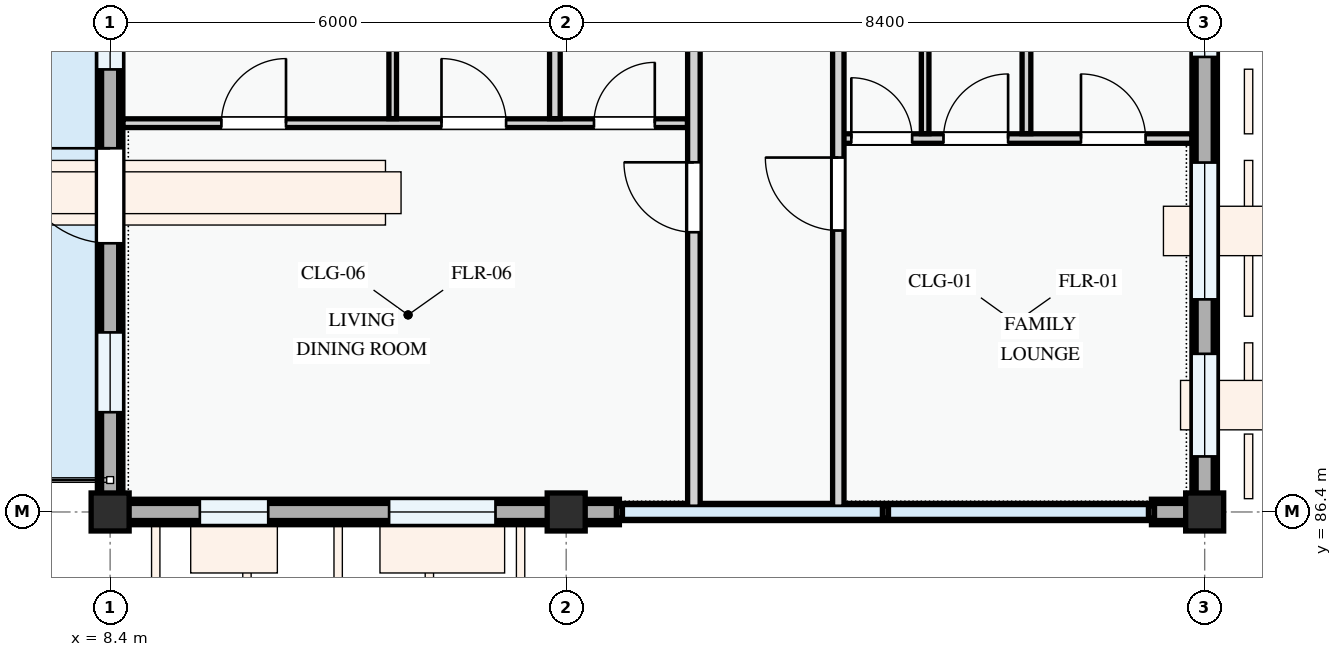
"""IFC4 building model, lengths in metres.
Left out: names, types, materials, properties, quantities, classifications, styles, units other than length and angle.
Written with IfcOpenShell. Run it as: python <this file> out.ifc"""

import sys

from ifc_helpers import new_model, si_unit, direction, frame, frame_2d, origin, origin_2d, place, context, subcontext, project, spatial, polyline, rectangle, outline, extrude, element, fill, save


model = new_model("IFC4")
c1 = context("Model", 3, precision=1e-05, world=origin(), true_north=direction((0.0, 1.0)))
c2 = subcontext(c1, "Body", "Model", "MODEL_VIEW")
j1 = project(units=[si_unit("LENGTHUNIT", "METRE"), si_unit("PLANEANGLEUNIT", "RADIAN")], contexts=[c1])
p1 = place(None, origin())
s1 = spatial("IfcSite", under=j1, at=p1, CompositionType="ELEMENT")
p2 = place(p1, origin())
s2 = spatial("IfcBuilding", under=s1, at=p2, CompositionType="ELEMENT")
p3 = place(p2, frame((0.0, 0.0, 51.0)))
s3 = spatial("IfcBuildingStorey", under=s2, at=p3, CompositionType="ELEMENT", Elevation=51.0)
for number, where, z_axis, x_axis in (
    (1, (8.4, 86.4, 0.0), (0.0, 0.0, 1.0), (1.0, 0.0, 0.0)),
    (2, (14.4, 86.4, 0.0), (0.0, 0.0, 1.0), (1.0, 0.0, 0.0)),
    (3, (22.8, 86.4, 0.0), (0.0, 0.0, 1.0), (1.0, 0.0, 0.0)),
):
    element("IfcColumn", number, at=place(p3, frame(where, z_axis=z_axis, x_axis=x_axis)), inside=s3, PredefinedType="COLUMN", context=c2, shape_type="SweptSolid", body=[
        extrude(rectangle(XDim=0.5, YDim=0.5, at=origin_2d()), origin(), (0.0, 0.0, 1.0), 3.3),
    ])
p4 = place(p3, frame((8.4, 94.8, 0.0), z_axis=(0.0, 0.0, 1.0), x_axis=(0.0, -1.0, 0.0)))
e4 = element("IfcWall", 4, at=p4, inside=s3, PredefinedType="STANDARD", context=c2, shape_type="SweptSolid", body=[
    extrude(rectangle(XDim=8.4, YDim=0.335, at=frame_2d((4.2, 0.0))), origin(), (0.0, 0.0, 1.0), 2.445),
])
p5 = place(p4, frame((3.615, 0.0, 0.0)))
e5 = element("IfcOpeningElement", 5, at=p5, cuts=e4, PredefinedType="OPENING", context=c2, shape_type="SweptSolid", body=[
    extrude(rectangle(XDim=1.25, YDim=2.2, at=frame_2d((0.625, 1.1))), frame((0.0, 0.177, 0.0), z_axis=(0.0, -1.0, 0.0), x_axis=(1.0, 0.0, 0.0)), (0.0, 0.0, 1.0), 0.355),
])
p6 = place(p4, frame((0.897, 0.0, 0.78)))
e6 = element("IfcOpeningElement", 6, at=p6, cuts=e4, PredefinedType="OPENING", context=c2, shape_type="SweptSolid", body=[
    extrude(rectangle(XDim=1.68, YDim=1.46, at=frame_2d((0.84, 0.73))), frame((0.0, 0.177, 0.0), z_axis=(0.0, -1.0, 0.0), x_axis=(1.0, 0.0, 0.0)), (0.0, 0.0, 1.0), 0.355),
])
p7 = place(p4, frame((6.038, 0.0, 0.78)))
e7 = element("IfcOpeningElement", 7, at=p7, cuts=e4, PredefinedType="OPENING", context=c2, shape_type="SweptSolid", body=[
    extrude(rectangle(XDim=1.05, YDim=1.2, at=frame_2d((0.525, 0.6))), frame((0.0, 0.177, 0.0), z_axis=(0.0, -1.0, 0.0), x_axis=(1.0, 0.0, 0.0)), (0.0, 0.0, 1.0), 0.355),
])
p8 = place(p3, frame((8.4, 86.4, 0.0), z_axis=(0.0, 0.0, 1.0), x_axis=(1.0, 0.0, 0.0)))
e8 = element("IfcWall", 8, at=p8, inside=s3, PredefinedType="STANDARD", context=c2, shape_type="SweptSolid", body=[
    extrude(rectangle(XDim=6.0, YDim=0.335, at=frame_2d((3.0, 0.0))), origin(), (0.0, 0.0, 1.0), 2.545),
])
p9 = place(p8, frame((1.18, 0.0, 0.78)))
e9 = element("IfcOpeningElement", 9, at=p9, cuts=e8, PredefinedType="OPENING", context=c2, shape_type="SweptSolid", body=[
    extrude(rectangle(XDim=0.9, YDim=1.2, at=frame_2d((0.45, 0.6))), frame((0.0, 0.177, 0.0), z_axis=(0.0, -1.0, 0.0), x_axis=(1.0, 0.0, 0.0)), (0.0, 0.0, 1.0), 0.355),
])
p10 = place(p8, frame((3.67, 0.0, 0.78)))
e10 = element("IfcOpeningElement", 10, at=p10, cuts=e8, PredefinedType="OPENING", context=c2, shape_type="SweptSolid", body=[
    extrude(rectangle(XDim=1.4, YDim=1.45, at=frame_2d((0.7, 0.725))), frame((0.0, 0.177, 0.0), z_axis=(0.0, -1.0, 0.0), x_axis=(1.0, 0.0, 0.0)), (0.0, 0.0, 1.0), 0.355),
])
p11 = place(p3, frame((14.4, 86.4, 0.0), z_axis=(0.0, 0.0, 1.0), x_axis=(1.0, 0.0, 0.0)))
e11 = element("IfcWall", 11, at=p11, inside=s3, PredefinedType="STANDARD", context=c2, shape_type="SweptSolid", body=[
    extrude(rectangle(XDim=0.7, YDim=0.335, at=frame_2d((0.35, 0.0))), origin(), (0.0, 0.0, 1.0), 2.395),
])
p12 = place(p3, frame((22.1, 86.4, 0.0), z_axis=(0.0, 0.0, 1.0), x_axis=(1.0, 0.0, 0.0)))
e12 = element("IfcWall", 12, at=p12, inside=s3, PredefinedType="STANDARD", context=c2, shape_type="SweptSolid", body=[
    extrude(rectangle(XDim=0.531, YDim=0.335, at=frame_2d((0.265, 0.0))), origin(), (0.0, 0.0, 1.0), 2.395),
])
p13 = place(p3, frame((22.8, 86.4, 0.0), z_axis=(0.0, 0.0, 1.0), x_axis=(0.0, 1.0, 0.0)))
e13 = element("IfcWall", 13, at=p13, inside=s3, PredefinedType="STANDARD", context=c2, shape_type="SweptSolid", body=[
    extrude(rectangle(XDim=8.4, YDim=0.335, at=frame_2d((4.2, 0.0))), origin(), (0.0, 0.0, 1.0), 2.445),
])
p14 = place(p13, frame((0.731, 0.0, 0.78)))
e14 = element("IfcOpeningElement", 14, at=p14, cuts=e13, PredefinedType="OPENING", context=c2, shape_type="SweptSolid", body=[
    extrude(rectangle(XDim=1.35, YDim=1.55, at=frame_2d((0.675, 0.775))), frame((0.0, 0.177, 0.0), z_axis=(0.0, -1.0, 0.0), x_axis=(1.0, 0.0, 0.0)), (0.0, 0.0, 1.0), 0.355),
])
p15 = place(p13, frame((2.797, 0.0, 0.78)))
e15 = element("IfcOpeningElement", 15, at=p15, cuts=e13, PredefinedType="OPENING", context=c2, shape_type="SweptSolid", body=[
    extrude(rectangle(XDim=1.8, YDim=1.5, at=frame_2d((0.9, 0.75))), frame((0.0, 0.177, 0.0), z_axis=(0.0, -1.0, 0.0), x_axis=(1.0, 0.0, 0.0)), (0.0, 0.0, 1.0), 0.355),
])
p16 = place(p13, frame((5.986, 0.0, 0.78)))
e16 = element("IfcOpeningElement", 16, at=p16, cuts=e13, PredefinedType="OPENING", context=c2, shape_type="SweptSolid", body=[
    extrude(rectangle(XDim=1.15, YDim=1.25, at=frame_2d((0.575, 0.625))), frame((0.0, 0.177, 0.0), z_axis=(0.0, -1.0, 0.0), x_axis=(1.0, 0.0, 0.0)), (0.0, 0.0, 1.0), 0.355),
])
p17 = place(p3, frame((8.4, 94.8, 3.3), z_axis=(0.0, 0.0, 1.0), x_axis=(0.0, -1.0, 0.0)))
e17 = element("IfcWall", 17, at=p17, inside=s3, PredefinedType="PARAPET", context=c2, shape_type="SweptSolid", body=[
    extrude(outline(polyline([(0.0, 0.0), (8.4, 0.0), (8.4, 1.12), (7.7, 1.322), (7.0, 1.484), (6.3, 1.618), (5.6, 1.717), (4.9, 1.779), (4.2, 1.8), (3.5, 1.779), (2.8, 1.717), (2.1, 1.618), (1.4, 1.484), (0.7, 1.322), (0.0, 1.12), (0.0, 0.0)])), frame((0.0, 0.113, 0.0), z_axis=(0.0, -1.0, 0.0), x_axis=(1.0, 0.0, 0.0)), (0.0, 0.0, 1.0), 0.225),
])
p18 = place(p3, frame((8.4, 86.4, 3.3), z_axis=(0.0, 0.0, 1.0), x_axis=(1.0, 0.0, 0.0)))
e18 = element("IfcWall", 18, at=p18, inside=s3, PredefinedType="PARAPET", context=c2, shape_type="SweptSolid", body=[
    extrude(rectangle(XDim=14.4, YDim=0.225, at=frame_2d((7.2, 0.0))), origin(), (0.0, 0.0, 1.0), 1.15),
])
p19 = place(p3, frame((22.8, 86.4, 3.3), z_axis=(0.0, 0.0, 1.0), x_axis=(0.0, 1.0, 0.0)))
e19 = element("IfcWall", 19, at=p19, inside=s3, PredefinedType="PARAPET", context=c2, shape_type="SweptSolid", body=[
    extrude(rectangle(XDim=22.8, YDim=0.225, at=frame_2d((11.4, 0.0))), origin(), (0.0, 0.0, 1.0), 1.15),
])
p20 = place(p3, frame((8.57, 91.515, 0.0), z_axis=(0.0, 0.0, 1.0), x_axis=(1.0, 0.0, 0.0)))
e20 = element("IfcWall", 20, at=p20, inside=s3, PredefinedType="PARTITIONING", context=c2, shape_type="SweptSolid", body=[
    extrude(rectangle(XDim=7.426, YDim=0.115, at=frame_2d((3.713, 0.0))), origin(), (0.0, 0.0, 1.0), 3.0),
])
p21 = place(p20, frame((1.294, 0.0, 0.0)))
e21 = element("IfcOpeningElement", 21, at=p21, cuts=e20, PredefinedType="OPENING", context=c2, shape_type="SweptSolid", body=[
    extrude(rectangle(XDim=0.85, YDim=2.1, at=frame_2d((0.425, 1.05))), frame((0.0, 0.067, 0.0), z_axis=(0.0, -1.0, 0.0), x_axis=(1.0, 0.0, 0.0)), (0.0, 0.0, 1.0), 0.135),
])
p22 = place(p20, frame((4.19, 0.0, 0.0)))
e22 = element("IfcOpeningElement", 22, at=p22, cuts=e20, PredefinedType="OPENING", context=c2, shape_type="SweptSolid", body=[
    extrude(rectangle(XDim=0.85, YDim=2.1, at=frame_2d((0.425, 1.05))), frame((0.0, 0.067, 0.0), z_axis=(0.0, -1.0, 0.0), x_axis=(1.0, 0.0, 0.0)), (0.0, 0.0, 1.0), 0.135),
])
p23 = place(p20, frame((6.196, 0.0, 0.0)))
e23 = element("IfcOpeningElement", 23, at=p23, cuts=e20, PredefinedType="OPENING", context=c2, shape_type="SweptSolid", body=[
    extrude(rectangle(XDim=0.8, YDim=2.1, at=frame_2d((0.4, 1.05))), frame((0.0, 0.067, 0.0), z_axis=(0.0, -1.0, 0.0), x_axis=(1.0, 0.0, 0.0)), (0.0, 0.0, 1.0), 0.135),
])
p24 = place(p3, frame((12.118, 91.574, 0.0), z_axis=(0.0, 0.0, 1.0), x_axis=(0.0, 1.0, 0.0)))
e24 = element("IfcWall", 24, at=p24, inside=s3, PredefinedType="PARTITIONING", context=c2, shape_type="SweptSolid", body=[
    extrude(rectangle(XDim=4.884, YDim=0.1, at=frame_2d((2.442, 0.0))), origin(), (0.0, 0.0, 1.0), 3.0),
])
p25 = place(p3, frame((14.251, 91.574, 0.0), z_axis=(0.0, 0.0, 1.0), x_axis=(0.0, 1.0, 0.0)))
e25 = element("IfcWall", 25, at=p25, inside=s3, PredefinedType="PARTITIONING", context=c2, shape_type="SweptSolid", body=[
    extrude(rectangle(XDim=4.884, YDim=0.14, at=frame_2d((2.442, 0.0))), origin(), (0.0, 0.0, 1.0), 2.445),
])
p26 = place(p3, frame((17.98, 91.313, 0.0), z_axis=(0.0, 0.0, 1.0), x_axis=(1.0, 0.0, 0.0)))
e26 = element("IfcWall", 26, at=p26, inside=s3, PredefinedType="PARTITIONING", context=c2, shape_type="SweptSolid", body=[
    extrude(rectangle(XDim=4.651, YDim=0.125, at=frame_2d((2.325, 0.0))), origin(), (0.0, 0.0, 1.0), 3.0),
])
p27 = place(p26, frame((0.171, 0.0, 0.0)))
e27 = element("IfcOpeningElement", 27, at=p27, cuts=e26, PredefinedType="OPENING", context=c2, shape_type="SweptSolid", body=[
    extrude(rectangle(XDim=0.8, YDim=2.1, at=frame_2d((0.4, 1.05))), frame((0.0, 0.073, 0.0), z_axis=(0.0, -1.0, 0.0), x_axis=(1.0, 0.0, 0.0)), (0.0, 0.0, 1.0), 0.145),
])
p28 = place(p26, frame((1.384, 0.0, 0.0)))
e28 = element("IfcOpeningElement", 28, at=p28, cuts=e26, PredefinedType="OPENING", context=c2, shape_type="SweptSolid", body=[
    extrude(rectangle(XDim=0.85, YDim=2.1, at=frame_2d((0.425, 1.05))), frame((0.0, 0.073, 0.0), z_axis=(0.0, -1.0, 0.0), x_axis=(1.0, 0.0, 0.0)), (0.0, 0.0, 1.0), 0.145),
])
p29 = place(p26, frame((3.193, 0.0, 0.0)))
e29 = element("IfcOpeningElement", 29, at=p29, cuts=e26, PredefinedType="OPENING", context=c2, shape_type="SweptSolid", body=[
    extrude(rectangle(XDim=0.85, YDim=2.1, at=frame_2d((0.425, 1.05))), frame((0.0, 0.073, 0.0), z_axis=(0.0, -1.0, 0.0), x_axis=(1.0, 0.0, 0.0)), (0.0, 0.0, 1.0), 0.145),
])
p30 = place(p3, frame((20.455, 91.377, 0.0), z_axis=(0.0, 0.0, 1.0), x_axis=(0.0, 1.0, 0.0)))
e30 = element("IfcWall", 30, at=p30, inside=s3, PredefinedType="PARTITIONING", context=c2, shape_type="SweptSolid", body=[
    extrude(rectangle(XDim=5.098, YDim=0.115, at=frame_2d((2.549, 0.0))), origin(), (0.0, 0.0, 1.0), 3.0),
])
p31 = place(p3, frame((19.122, 91.377, 0.0), z_axis=(0.0, 0.0, 1.0), x_axis=(0.0, 1.0, 0.0)))
e31 = element("IfcWall", 31, at=p31, inside=s3, PredefinedType="PARTITIONING", context=c2, shape_type="SweptSolid", body=[
    extrude(rectangle(XDim=5.098, YDim=0.1, at=frame_2d((2.549, 0.0))), origin(), (0.0, 0.0, 1.0), 3.0),
])
p32 = place(p3, frame((16.08, 86.46, 0.0), z_axis=(0.0, 0.0, 1.0), x_axis=(0.0, 1.0, 0.0)))
e32 = element("IfcWall", 32, at=p32, inside=s3, PredefinedType="PARTITIONING", context=c2, shape_type="SweptSolid", body=[
    extrude(rectangle(XDim=22.88, YDim=0.165, at=frame_2d((11.44, 0.0))), origin(), (0.0, 0.0, 1.0), 3.0),
])
p33 = place(p32, frame((3.62, 0.0, 0.0)))
e33 = element("IfcOpeningElement", 33, at=p33, cuts=e32, PredefinedType="OPENING", context=c2, shape_type="SweptSolid", body=[
    extrude(rectangle(XDim=0.92, YDim=2.1, at=frame_2d((0.46, 1.05))), frame((0.0, 0.093, 0.0), z_axis=(0.0, -1.0, 0.0), x_axis=(1.0, 0.0, 0.0)), (0.0, 0.0, 1.0), 0.185),
])
p34 = place(p32, frame((10.822, 0.0, 0.0)))
e34 = element("IfcOpeningElement", 34, at=p34, cuts=e32, PredefinedType="OPENING", context=c2, shape_type="SweptSolid", body=[
    extrude(rectangle(XDim=0.92, YDim=2.1, at=frame_2d((0.46, 1.05))), frame((0.0, 0.093, 0.0), z_axis=(0.0, -1.0, 0.0), x_axis=(1.0, 0.0, 0.0)), (0.0, 0.0, 1.0), 0.185),
])
p35 = place(p3, frame((17.98, 86.46, 0.0), z_axis=(0.0, 0.0, 1.0), x_axis=(0.0, 1.0, 0.0)))
e35 = element("IfcWall", 35, at=p35, inside=s3, PredefinedType="PARTITIONING", context=c2, shape_type="SweptSolid", body=[
    extrude(rectangle(XDim=22.88, YDim=0.15, at=frame_2d((11.44, 0.0))), origin(), (0.0, 0.0, 1.0), 3.0),
])
p36 = place(p35, frame((3.643, 0.0, 0.0)))
e36 = element("IfcOpeningElement", 36, at=p36, cuts=e35, PredefinedType="OPENING", context=c2, shape_type="SweptSolid", body=[
    extrude(rectangle(XDim=0.96, YDim=2.12, at=frame_2d((0.48, 1.06))), frame((0.0, 0.085, 0.0), z_axis=(0.0, -1.0, 0.0), x_axis=(1.0, 0.0, 0.0)), (0.0, 0.0, 1.0), 0.17),
])
p37 = place(p35, frame((10.798, 0.0, 0.0)))
e37 = element("IfcOpeningElement", 37, at=p37, cuts=e35, PredefinedType="OPENING", context=c2, shape_type="SweptSolid", body=[
    extrude(rectangle(XDim=0.92, YDim=2.1, at=frame_2d((0.46, 1.05))), frame((0.0, 0.085, 0.0), z_axis=(0.0, -1.0, 0.0), x_axis=(1.0, 0.0, 0.0)), (0.0, 0.0, 1.0), 0.17),
])
p38 = place(p5, frame((1.25, 0.0, 0.0), z_axis=(0.0, 0.0, 1.0), x_axis=(-1.0, 0.0, 0.0)))
e38 = element("IfcDoor", 38, at=p38, inside=s3, OperationType="SINGLE_SWING_RIGHT", PredefinedType="DOOR", context=c2, shape_type="SweptSolid", body=[
    extrude(rectangle(XDim=1.25, YDim=2.2, at=frame_2d((0.625, 1.1))), frame((0.0, 0.025, 0.0), z_axis=(0.0, -1.0, 0.0), x_axis=(1.0, 0.0, 0.0)), (0.0, 0.0, 1.0), 0.05),
])
fill(e5, e38)
p39 = place(p6, origin())
e39 = element("IfcWindow", 39, at=p39, inside=s3, PartitioningType="DOUBLE_PANEL_VERTICAL", PredefinedType="WINDOW", context=c2, shape_type="SweptSolid", body=[
    extrude(rectangle(XDim=1.68, YDim=1.46, at=frame_2d((0.84, 0.73))), frame((0.0, 0.03, 0.0), z_axis=(0.0, -1.0, 0.0), x_axis=(1.0, 0.0, 0.0)), (0.0, 0.0, 1.0), 0.06),
])
fill(e6, e39)
p40 = place(p7, origin())
e40 = element("IfcWindow", 40, at=p40, inside=s3, PartitioningType="SINGLE_PANEL", PredefinedType="WINDOW", context=c2, shape_type="SweptSolid", body=[
    extrude(rectangle(XDim=1.05, YDim=1.2, at=frame_2d((0.525, 0.6))), frame((0.0, 0.03, 0.0), z_axis=(0.0, -1.0, 0.0), x_axis=(1.0, 0.0, 0.0)), (0.0, 0.0, 1.0), 0.06),
])
fill(e7, e40)
p41 = place(p9, origin())
e41 = element("IfcWindow", 41, at=p41, inside=s3, PartitioningType="SINGLE_PANEL", PredefinedType="WINDOW", context=c2, shape_type="SweptSolid", body=[
    extrude(rectangle(XDim=0.9, YDim=1.2, at=frame_2d((0.45, 0.6))), frame((0.0, 0.03, 0.0), z_axis=(0.0, -1.0, 0.0), x_axis=(1.0, 0.0, 0.0)), (0.0, 0.0, 1.0), 0.06),
])
fill(e9, e41)
p42 = place(p10, origin())
e42 = element("IfcWindow", 42, at=p42, inside=s3, PartitioningType="SINGLE_PANEL", PredefinedType="WINDOW", context=c2, shape_type="SweptSolid", body=[
    extrude(rectangle(XDim=1.4, YDim=1.45, at=frame_2d((0.7, 0.725))), frame((0.0, 0.03, 0.0), z_axis=(0.0, -1.0, 0.0), x_axis=(1.0, 0.0, 0.0)), (0.0, 0.0, 1.0), 0.06),
])
fill(e10, e42)
p43 = place(p14, origin())
e43 = element("IfcWindow", 43, at=p43, inside=s3, PartitioningType="SINGLE_PANEL", PredefinedType="WINDOW", context=c2, shape_type="SweptSolid", body=[
    extrude(rectangle(XDim=1.35, YDim=1.55, at=frame_2d((0.675, 0.775))), frame((0.0, 0.03, 0.0), z_axis=(0.0, -1.0, 0.0), x_axis=(1.0, 0.0, 0.0)), (0.0, 0.0, 1.0), 0.06),
])
fill(e14, e43)
p44 = place(p15, origin())
e44 = element("IfcWindow", 44, at=p44, inside=s3, PartitioningType="DOUBLE_PANEL_VERTICAL", PredefinedType="WINDOW", context=c2, shape_type="SweptSolid", body=[
    extrude(rectangle(XDim=1.8, YDim=1.5, at=frame_2d((0.9, 0.75))), frame((0.0, 0.03, 0.0), z_axis=(0.0, -1.0, 0.0), x_axis=(1.0, 0.0, 0.0)), (0.0, 0.0, 1.0), 0.06),
])
fill(e15, e44)
p45 = place(p16, origin())
e45 = element("IfcWindow", 45, at=p45, inside=s3, PartitioningType="SINGLE_PANEL", PredefinedType="WINDOW", context=c2, shape_type="SweptSolid", body=[
    extrude(rectangle(XDim=1.15, YDim=1.25, at=frame_2d((0.575, 0.625))), frame((0.0, 0.03, 0.0), z_axis=(0.0, -1.0, 0.0), x_axis=(1.0, 0.0, 0.0)), (0.0, 0.0, 1.0), 0.06),
])
fill(e16, e45)
p46 = place(p21, origin())
e46 = element("IfcDoor", 46, at=p46, inside=s3, OperationType="SINGLE_SWING_RIGHT", PredefinedType="DOOR", context=c2, shape_type="SweptSolid", body=[
    extrude(rectangle(XDim=0.85, YDim=2.1, at=frame_2d((0.425, 1.05))), frame((0.0, 0.025, 0.0), z_axis=(0.0, -1.0, 0.0), x_axis=(1.0, 0.0, 0.0)), (0.0, 0.0, 1.0), 0.05),
])
fill(e21, e46)
p47 = place(p22, origin())
e47 = element("IfcDoor", 47, at=p47, inside=s3, OperationType="SINGLE_SWING_LEFT", PredefinedType="DOOR", context=c2, shape_type="SweptSolid", body=[
    extrude(rectangle(XDim=0.85, YDim=2.1, at=frame_2d((0.425, 1.05))), frame((0.0, 0.025, 0.0), z_axis=(0.0, -1.0, 0.0), x_axis=(1.0, 0.0, 0.0)), (0.0, 0.0, 1.0), 0.05),
])
fill(e22, e47)
p48 = place(p23, origin())
e48 = element("IfcDoor", 48, at=p48, inside=s3, OperationType="SINGLE_SWING_RIGHT", PredefinedType="DOOR", context=c2, shape_type="SweptSolid", body=[
    extrude(rectangle(XDim=0.8, YDim=2.1, at=frame_2d((0.4, 1.05))), frame((0.0, 0.025, 0.0), z_axis=(0.0, -1.0, 0.0), x_axis=(1.0, 0.0, 0.0)), (0.0, 0.0, 1.0), 0.05),
])
fill(e23, e48)
p49 = place(p27, origin())
e49 = element("IfcDoor", 49, at=p49, inside=s3, OperationType="SINGLE_SWING_LEFT", PredefinedType="DOOR", context=c2, shape_type="SweptSolid", body=[
    extrude(rectangle(XDim=0.8, YDim=2.1, at=frame_2d((0.4, 1.05))), frame((0.0, 0.025, 0.0), z_axis=(0.0, -1.0, 0.0), x_axis=(1.0, 0.0, 0.0)), (0.0, 0.0, 1.0), 0.05),
])
fill(e27, e49)
p50 = place(p28, origin())
e50 = element("IfcDoor", 50, at=p50, inside=s3, OperationType="SINGLE_SWING_RIGHT", PredefinedType="DOOR", context=c2, shape_type="SweptSolid", body=[
    extrude(rectangle(XDim=0.85, YDim=2.1, at=frame_2d((0.425, 1.05))), frame((0.0, 0.025, 0.0), z_axis=(0.0, -1.0, 0.0), x_axis=(1.0, 0.0, 0.0)), (0.0, 0.0, 1.0), 0.05),
])
fill(e28, e50)
p51 = place(p29, origin())
e51 = element("IfcDoor", 51, at=p51, inside=s3, OperationType="SINGLE_SWING_LEFT", PredefinedType="DOOR", context=c2, shape_type="SweptSolid", body=[
    extrude(rectangle(XDim=0.85, YDim=2.1, at=frame_2d((0.425, 1.05))), frame((0.0, 0.025, 0.0), z_axis=(0.0, -1.0, 0.0), x_axis=(1.0, 0.0, 0.0)), (0.0, 0.0, 1.0), 0.05),
])
fill(e29, e51)
p52 = place(p33, origin())
e52 = element("IfcDoor", 52, at=p52, inside=s3, OperationType="SINGLE_SWING_RIGHT", PredefinedType="DOOR", context=c2, shape_type="SweptSolid", body=[
    extrude(rectangle(XDim=0.92, YDim=2.1, at=frame_2d((0.46, 1.05))), frame((0.0, 0.025, 0.0), z_axis=(0.0, -1.0, 0.0), x_axis=(1.0, 0.0, 0.0)), (0.0, 0.0, 1.0), 0.05),
])
fill(e33, e52)
p53 = place(p36, origin())
e53 = element("IfcDoor", 53, at=p53, inside=s3, OperationType="SINGLE_SWING_RIGHT", PredefinedType="DOOR", context=c2, shape_type="SweptSolid", body=[
    extrude(rectangle(XDim=0.96, YDim=2.12, at=frame_2d((0.48, 1.06))), frame((0.0, 0.025, 0.0), z_axis=(0.0, -1.0, 0.0), x_axis=(1.0, 0.0, 0.0)), (0.0, 0.0, 1.0), 0.05),
])
fill(e36, e53)
save(model, sys.argv[1])
